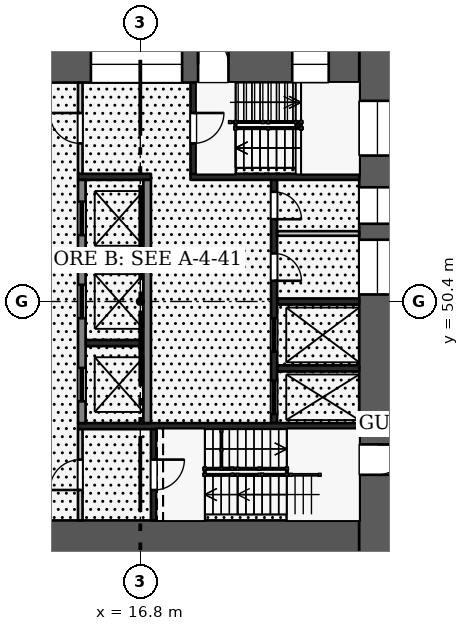
"""IFC4 building model, lengths in metres.
Left out: names, types, materials, properties, quantities, classifications, styles, units other than length and angle.
Written with IfcOpenShell. Run it as: python <this file> out.ifc"""

import sys

from ifc_helpers import new_model, si_unit, direction, frame, frame_2d, origin, place, context, subcontext, project, spatial, rectangle, extrude, element, fill, save


model = new_model("IFC4")
c1 = context("Model", 3, precision=1e-05, world=origin(), true_north=direction((0.0, 1.0)))
c2 = subcontext(c1, "Body", "Model", "MODEL_VIEW")
j1 = project(units=[si_unit("LENGTHUNIT", "METRE"), si_unit("PLANEANGLEUNIT", "RADIAN")], contexts=[c1])
p1 = place(None, origin())
s1 = spatial("IfcSite", under=j1, at=p1, CompositionType="ELEMENT")
p2 = place(p1, origin())
s2 = spatial("IfcBuilding", under=s1, at=p2, CompositionType="ELEMENT")
p3 = place(p2, origin())
s3 = spatial("IfcBuildingStorey", under=s2, at=p3, CompositionType="ELEMENT", Elevation=0.0)
p4 = place(p3, frame((24.6, 58.8, 0.0), z_axis=(0.0, 0.0, 1.0), x_axis=(0.0, -1.0, 0.0)))
e1 = element("IfcWall", 1, at=p4, inside=s3, PredefinedType="SHEAR", context=c2, shape_type="SweptSolid", body=[
    extrude(rectangle(XDim=16.8, YDim=1.2, at=frame_2d((8.4, 0.0))), origin(), (0.0, 0.0, 1.0), 8.7),
])
p5 = place(p4, frame((13.1, 0.0, 0.0)))
e2 = element("IfcOpeningElement", 2, at=p5, cuts=e1, PredefinedType="OPENING", context=c2, shape_type="SweptSolid", body=[
    extrude(rectangle(XDim=1.0, YDim=2.1, at=frame_2d((0.5, 1.05))), frame((0.0, 0.61, 0.0), z_axis=(0.0, -1.0, 0.0), x_axis=(1.0, 0.0, 0.0)), (0.0, 0.0, 1.0), 1.22),
])
p6 = place(p4, frame((1.8, 0.0, 0.5)))
e3 = element("IfcOpeningElement", 3, at=p6, cuts=e1, PredefinedType="OPENING", context=c2, shape_type="SweptSolid", body=[
    extrude(rectangle(XDim=1.8, YDim=2.4, at=frame_2d((0.9, 1.2))), frame((0.0, 0.61, 0.0), z_axis=(0.0, -1.0, 0.0), x_axis=(1.0, 0.0, 0.0)), (0.0, 0.0, 1.0), 1.22),
])
p7 = place(p4, frame((4.644, 0.0, 1.6)))
e4 = element("IfcOpeningElement", 4, at=p7, cuts=e1, PredefinedType="OPENING", context=c2, shape_type="SweptSolid", body=[
    extrude(rectangle(XDim=1.2, YDim=1.2, at=frame_2d((0.6, 0.6))), frame((0.0, 0.61, 0.0), z_axis=(0.0, -1.0, 0.0), x_axis=(1.0, 0.0, 0.0)), (0.0, 0.0, 1.0), 1.22),
])
p8 = place(p4, frame((6.369, 0.0, 1.6)))
e5 = element("IfcOpeningElement", 5, at=p8, cuts=e1, PredefinedType="OPENING", context=c2, shape_type="SweptSolid", body=[
    extrude(rectangle(XDim=1.8, YDim=1.2, at=frame_2d((0.9, 0.6))), frame((0.0, 0.61, 0.0), z_axis=(0.0, -1.0, 0.0), x_axis=(1.0, 0.0, 0.0)), (0.0, 0.0, 1.0), 1.22),
])
p9 = place(p3, frame((9.6, 58.2, 0.0), z_axis=(0.0, 0.0, 1.0), x_axis=(1.0, 0.0, 0.0)))
e6 = element("IfcWall", 6, at=p9, inside=s3, PredefinedType="SHEAR", context=c2, shape_type="SweptSolid", body=[
    extrude(rectangle(XDim=14.4, YDim=1.2, at=frame_2d((7.2, 0.0))), origin(), (0.0, 0.0, 1.0), 8.7),
])
p10 = place(p9, frame((2.1, 0.0, 0.0)))
e7 = element("IfcOpeningElement", 7, at=p10, cuts=e6, PredefinedType="OPENING", context=c2, shape_type="SweptSolid", body=[
    extrude(rectangle(XDim=1.8, YDim=2.1, at=frame_2d((0.9, 1.05))), frame((0.0, 0.61, 0.0), z_axis=(0.0, -1.0, 0.0), x_axis=(1.0, 0.0, 0.0)), (0.0, 0.0, 1.0), 1.22),
])
p11 = place(p9, frame((9.1, 0.0, 0.0)))
e8 = element("IfcOpeningElement", 8, at=p11, cuts=e6, PredefinedType="OPENING", context=c2, shape_type="SweptSolid", body=[
    extrude(rectangle(XDim=1.0, YDim=2.1, at=frame_2d((0.5, 1.05))), frame((0.0, 0.61, 0.0), z_axis=(0.0, -1.0, 0.0), x_axis=(1.0, 0.0, 0.0)), (0.0, 0.0, 1.0), 1.22),
])
p12 = place(p9, frame((5.575, 0.0, 0.6)))
e9 = element("IfcOpeningElement", 9, at=p12, cuts=e6, PredefinedType="OPENING", context=c2, shape_type="SweptSolid", body=[
    extrude(rectangle(XDim=3.0, YDim=2.1, at=frame_2d((1.5, 1.05))), frame((0.0, 0.61, 0.0), z_axis=(0.0, -1.0, 0.0), x_axis=(1.0, 0.0, 0.0)), (0.0, 0.0, 1.0), 1.22),
])
p13 = place(p9, frame((12.197, 0.0, 0.5)))
e10 = element("IfcOpeningElement", 10, at=p13, cuts=e6, PredefinedType="OPENING", context=c2, shape_type="SweptSolid", body=[
    extrude(rectangle(XDim=1.2, YDim=2.4, at=frame_2d((0.6, 1.2))), frame((0.0, 0.61, 0.0), z_axis=(0.0, -1.0, 0.0), x_axis=(1.0, 0.0, 0.0)), (0.0, 0.0, 1.0), 1.22),
])
p14 = place(p3, frame((9.6, 42.6, 0.0), z_axis=(0.0, 0.0, 1.0), x_axis=(1.0, 0.0, 0.0)))
e11 = element("IfcWall", 11, at=p14, inside=s3, PredefinedType="SHEAR", context=c2, shape_type="SweptSolid", body=[
    extrude(rectangle(XDim=14.4, YDim=1.2, at=frame_2d((7.2, 0.0))), origin(), (0.0, 0.0, 1.0), 8.7),
])
p15 = place(p14, frame((2.1, 0.0, 0.0)))
e12 = element("IfcOpeningElement", 12, at=p15, cuts=e11, PredefinedType="OPENING", context=c2, shape_type="SweptSolid", body=[
    extrude(rectangle(XDim=1.8, YDim=2.1, at=frame_2d((0.9, 1.05))), frame((0.0, 0.61, 0.0), z_axis=(0.0, -1.0, 0.0), x_axis=(1.0, 0.0, 0.0)), (0.0, 0.0, 1.0), 1.22),
])
for number, where, z_axis, x_axis in (
    (13, (15.0, 51.767, 0.0), (0.0, 0.0, 1.0), (1.0, 0.0, 0.0)),
    (14, (15.0, 49.033, 0.0), (0.0, 0.0, 1.0), (1.0, 0.0, 0.0)),
):
    element("IfcWall", number, at=place(p3, frame(where, z_axis=z_axis, x_axis=x_axis)), inside=s3, PredefinedType="SHEAR", context=c2, shape_type="SweptSolid", body=[
        extrude(rectangle(XDim=1.9, YDim=0.2, at=frame_2d((0.95, 0.0))), origin(), (0.0, 0.0, 1.0), 8.7),
    ])
p16 = place(p3, frame((14.875, 54.4, 0.0), z_axis=(0.0, 0.0, 1.0), x_axis=(0.0, -1.0, 0.0)))
e15 = element("IfcWall", 15, at=p16, inside=s3, PredefinedType="SHEAR", context=c2, shape_type="SweptSolid", body=[
    extrude(rectangle(XDim=8.0, YDim=0.25, at=frame_2d((4.0, 0.0))), origin(), (0.0, 0.0, 1.0), 8.7),
])
p17 = place(p16, frame((0.717, 0.0, 0.0)))
e16 = element("IfcOpeningElement", 16, at=p17, cuts=e15, PredefinedType="OPENING", context=c2, shape_type="SweptSolid", body=[
    extrude(rectangle(XDim=1.1, YDim=2.1, at=frame_2d((0.55, 1.05))), frame((0.0, 0.135, 0.0), z_axis=(0.0, -1.0, 0.0), x_axis=(1.0, 0.0, 0.0)), (0.0, 0.0, 1.0), 0.27),
])
p18 = place(p16, frame((3.45, 0.0, 0.0)))
e17 = element("IfcOpeningElement", 17, at=p18, cuts=e15, PredefinedType="OPENING", context=c2, shape_type="SweptSolid", body=[
    extrude(rectangle(XDim=1.1, YDim=2.1, at=frame_2d((0.55, 1.05))), frame((0.0, 0.135, 0.0), z_axis=(0.0, -1.0, 0.0), x_axis=(1.0, 0.0, 0.0)), (0.0, 0.0, 1.0), 0.27),
])
p19 = place(p16, frame((6.183, 0.0, 0.0)))
e18 = element("IfcOpeningElement", 18, at=p19, cuts=e15, PredefinedType="OPENING", context=c2, shape_type="SweptSolid", body=[
    extrude(rectangle(XDim=1.1, YDim=2.1, at=frame_2d((0.55, 1.05))), frame((0.0, 0.135, 0.0), z_axis=(0.0, -1.0, 0.0), x_axis=(1.0, 0.0, 0.0)), (0.0, 0.0, 1.0), 0.27),
])
p20 = place(p3, frame((17.025, 54.4, 0.0), z_axis=(0.0, 0.0, 1.0), x_axis=(0.0, -1.0, 0.0)))
e19 = element("IfcWall", 19, at=p20, inside=s3, PredefinedType="SHEAR", context=c2, shape_type="SweptSolid", body=[
    extrude(rectangle(XDim=8.0, YDim=0.25, at=frame_2d((4.0, 0.0))), origin(), (0.0, 0.0, 1.0), 8.7),
])
for number, where, z_axis, x_axis in (
    (20, (21.3, 50.4, 0.0), (0.0, 0.0, 1.0), (1.0, 0.0, 0.0)),
    (21, (21.3, 48.2, 0.0), (0.0, 0.0, 1.0), (1.0, 0.0, 0.0)),
):
    element("IfcWall", number, at=place(p3, frame(where, z_axis=z_axis, x_axis=x_axis)), inside=s3, PredefinedType="SHEAR", context=c2, shape_type="SweptSolid", body=[
        extrude(rectangle(XDim=2.7, YDim=0.2, at=frame_2d((1.35, 0.0))), origin(), (0.0, 0.0, 1.0), 8.7),
    ])
p21 = place(p3, frame((21.3, 52.637, 0.0), z_axis=(0.0, 0.0, 1.0), x_axis=(1.0, 0.0, 0.0)))
e22 = element("IfcWall", 22, at=p21, inside=s3, PredefinedType="PARTITIONING", context=c2, shape_type="SweptSolid", body=[
    extrude(rectangle(XDim=2.7, YDim=0.15, at=frame_2d((1.35, 0.0))), origin(), (0.0, 0.0, 1.0), 8.7),
])
p22 = place(p3, frame((21.2, 54.4, 0.0), z_axis=(0.0, 0.0, 1.0), x_axis=(0.0, -1.0, 0.0)))
e23 = element("IfcWall", 23, at=p22, inside=s3, PredefinedType="SHEAR", context=c2, shape_type="SweptSolid", body=[
    extrude(rectangle(XDim=8.0, YDim=0.2, at=frame_2d((4.0, 0.0))), origin(), (0.0, 0.0, 1.0), 8.7),
])
p23 = place(p22, frame((0.394, 0.0, 0.0)))
e24 = element("IfcOpeningElement", 24, at=p23, cuts=e23, PredefinedType="OPENING", context=c2, shape_type="SweptSolid", body=[
    extrude(rectangle(XDim=0.9, YDim=2.1, at=frame_2d((0.45, 1.05))), frame((0.0, 0.11, 0.0), z_axis=(0.0, -1.0, 0.0), x_axis=(1.0, 0.0, 0.0)), (0.0, 0.0, 1.0), 0.22),
])
p24 = place(p22, frame((2.419, 0.0, 0.0)))
e25 = element("IfcOpeningElement", 25, at=p24, cuts=e23, PredefinedType="OPENING", context=c2, shape_type="SweptSolid", body=[
    extrude(rectangle(XDim=0.9, YDim=2.1, at=frame_2d((0.45, 1.05))), frame((0.0, 0.11, 0.0), z_axis=(0.0, -1.0, 0.0), x_axis=(1.0, 0.0, 0.0)), (0.0, 0.0, 1.0), 0.22),
])
p25 = place(p22, frame((4.55, 0.0, 0.0)))
e26 = element("IfcOpeningElement", 26, at=p25, cuts=e23, PredefinedType="OPENING", context=c2, shape_type="SweptSolid", body=[
    extrude(rectangle(XDim=1.1, YDim=2.1, at=frame_2d((0.55, 1.05))), frame((0.0, 0.11, 0.0), z_axis=(0.0, -1.0, 0.0), x_axis=(1.0, 0.0, 0.0)), (0.0, 0.0, 1.0), 0.22),
])
p26 = place(p22, frame((6.6, 0.0, 0.0)))
e27 = element("IfcOpeningElement", 27, at=p26, cuts=e23, PredefinedType="OPENING", context=c2, shape_type="SweptSolid", body=[
    extrude(rectangle(XDim=1.1, YDim=2.1, at=frame_2d((0.55, 1.05))), frame((0.0, 0.11, 0.0), z_axis=(0.0, -1.0, 0.0), x_axis=(1.0, 0.0, 0.0)), (0.0, 0.0, 1.0), 0.22),
])
p27 = place(p3, frame((14.75, 54.5, 0.0), z_axis=(0.0, 0.0, 1.0), x_axis=(1.0, 0.0, 0.0)))
e28 = element("IfcWall", 28, at=p27, inside=s3, PredefinedType="SHEAR", context=c2, shape_type="SweptSolid", body=[
    extrude(rectangle(XDim=2.4, YDim=0.2, at=frame_2d((1.2, 0.0))), origin(), (0.0, 0.0, 1.0), 8.7),
])
p28 = place(p3, frame((18.45, 54.5, 0.0), z_axis=(0.0, 0.0, 1.0), x_axis=(1.0, 0.0, 0.0)))
e29 = element("IfcWall", 29, at=p28, inside=s3, PredefinedType="SHEAR", context=c2, shape_type="SweptSolid", body=[
    extrude(rectangle(XDim=5.55, YDim=0.2, at=frame_2d((2.775, 0.0))), origin(), (0.0, 0.0, 1.0), 8.7),
])
p29 = place(p3, frame((14.825, 57.6, 0.0), z_axis=(0.0, 0.0, 1.0), x_axis=(0.0, -1.0, 0.0)))
e30 = element("IfcWall", 30, at=p29, inside=s3, PredefinedType="PARTITIONING", context=c2, shape_type="SweptSolid", body=[
    extrude(rectangle(XDim=3.0, YDim=0.15, at=frame_2d((1.5, 0.0))), origin(), (0.0, 0.0, 1.0), 8.7),
])
p30 = place(p29, frame((1.0, 0.0, 0.0)))
e31 = element("IfcOpeningElement", 31, at=p30, cuts=e30, PredefinedType="OPENING", context=c2, shape_type="SweptSolid", body=[
    extrude(rectangle(XDim=1.0, YDim=2.1, at=frame_2d((0.5, 1.05))), frame((0.0, 0.085, 0.0), z_axis=(0.0, -1.0, 0.0), x_axis=(1.0, 0.0, 0.0)), (0.0, 0.0, 1.0), 0.17),
])
p31 = place(p3, frame((18.55, 57.6, 0.0), z_axis=(0.0, 0.0, 1.0), x_axis=(0.0, -1.0, 0.0)))
e32 = element("IfcWall", 32, at=p31, inside=s3, PredefinedType="SHEAR", context=c2, shape_type="SweptSolid", body=[
    extrude(rectangle(XDim=3.0, YDim=0.2, at=frame_2d((1.5, 0.0))), origin(), (0.0, 0.0, 1.0), 8.7),
])
p32 = place(p31, frame((1.0, 0.0, 0.0)))
e33 = element("IfcOpeningElement", 33, at=p32, cuts=e32, PredefinedType="OPENING", context=c2, shape_type="SweptSolid", body=[
    extrude(rectangle(XDim=1.0, YDim=2.1, at=frame_2d((0.5, 1.05))), frame((0.0, 0.11, 0.0), z_axis=(0.0, -1.0, 0.0), x_axis=(1.0, 0.0, 0.0)), (0.0, 0.0, 1.0), 0.22),
])
p33 = place(p3, frame((14.75, 46.3, 0.0), z_axis=(0.0, 0.0, 1.0), x_axis=(1.0, 0.0, 0.0)))
e34 = element("IfcWall", 34, at=p33, inside=s3, PredefinedType="SHEAR", context=c2, shape_type="SweptSolid", body=[
    extrude(rectangle(XDim=9.25, YDim=0.2, at=frame_2d((4.625, 0.0))), origin(), (0.0, 0.0, 1.0), 8.7),
])
p34 = place(p3, frame((14.825, 46.2, 0.0), z_axis=(0.0, 0.0, 1.0), x_axis=(0.0, -1.0, 0.0)))
e35 = element("IfcWall", 35, at=p34, inside=s3, PredefinedType="PARTITIONING", context=c2, shape_type="SweptSolid", body=[
    extrude(rectangle(XDim=3.0, YDim=0.15, at=frame_2d((1.5, 0.0))), origin(), (0.0, 0.0, 1.0), 8.7),
])
p35 = place(p34, frame((1.0, 0.0, 0.0)))
e36 = element("IfcOpeningElement", 36, at=p35, cuts=e35, PredefinedType="OPENING", context=c2, shape_type="SweptSolid", body=[
    extrude(rectangle(XDim=1.0, YDim=2.1, at=frame_2d((0.5, 1.05))), frame((0.0, 0.085, 0.0), z_axis=(0.0, -1.0, 0.0), x_axis=(1.0, 0.0, 0.0)), (0.0, 0.0, 1.0), 0.17),
])
p36 = place(p3, frame((17.25, 46.2, 0.0), z_axis=(0.0, 0.0, 1.0), x_axis=(0.0, -1.0, 0.0)))
e37 = element("IfcWall", 37, at=p36, inside=s3, PredefinedType="SHEAR", context=c2, shape_type="SweptSolid", body=[
    extrude(rectangle(XDim=3.0, YDim=0.2, at=frame_2d((1.5, 0.0))), origin(), (0.0, 0.0, 1.0), 8.7),
])
p37 = place(p36, frame((1.0, 0.0, 0.0)))
e38 = element("IfcOpeningElement", 38, at=p37, cuts=e37, PredefinedType="OPENING", context=c2, shape_type="SweptSolid", body=[
    extrude(rectangle(XDim=1.0, YDim=2.1, at=frame_2d((0.5, 1.05))), frame((0.0, 0.11, 0.0), z_axis=(0.0, -1.0, 0.0), x_axis=(1.0, 0.0, 0.0)), (0.0, 0.0, 1.0), 0.22),
])
p38 = place(p5, origin())
e39 = element("IfcDoor", 39, at=p38, inside=s3, OperationType="SINGLE_SWING_LEFT", PredefinedType="DOOR", context=c2, shape_type="SweptSolid", body=[
    extrude(rectangle(XDim=1.0, YDim=2.1, at=frame_2d((0.5, 1.05))), frame((0.0, 0.025, 0.0), z_axis=(0.0, -1.0, 0.0), x_axis=(1.0, 0.0, 0.0)), (0.0, 0.0, 1.0), 0.05),
])
fill(e2, e39)
p39 = place(p11, origin())
e40 = element("IfcDoor", 40, at=p39, inside=s3, OperationType="SINGLE_SWING_LEFT", PredefinedType="DOOR", context=c2, shape_type="SweptSolid", body=[
    extrude(rectangle(XDim=1.0, YDim=2.1, at=frame_2d((0.5, 1.05))), frame((0.0, 0.025, 0.0), z_axis=(0.0, -1.0, 0.0), x_axis=(1.0, 0.0, 0.0)), (0.0, 0.0, 1.0), 0.05),
])
fill(e8, e40)
p40 = place(p17, origin())
e41 = element("IfcDoor", 41, at=p40, inside=s3, OperationType="DOUBLE_DOOR_SLIDING", PredefinedType="DOOR", context=c2, shape_type="SweptSolid", body=[
    extrude(rectangle(XDim=1.1, YDim=2.1, at=frame_2d((0.55, 1.05))), frame((0.0, 0.025, 0.0), z_axis=(0.0, -1.0, 0.0), x_axis=(1.0, 0.0, 0.0)), (0.0, 0.0, 1.0), 0.05),
])
fill(e16, e41)
p41 = place(p18, origin())
e42 = element("IfcDoor", 42, at=p41, inside=s3, OperationType="DOUBLE_DOOR_SLIDING", PredefinedType="DOOR", context=c2, shape_type="SweptSolid", body=[
    extrude(rectangle(XDim=1.1, YDim=2.1, at=frame_2d((0.55, 1.05))), frame((0.0, 0.025, 0.0), z_axis=(0.0, -1.0, 0.0), x_axis=(1.0, 0.0, 0.0)), (0.0, 0.0, 1.0), 0.05),
])
fill(e17, e42)
p42 = place(p19, origin())
e43 = element("IfcDoor", 43, at=p42, inside=s3, OperationType="DOUBLE_DOOR_SLIDING", PredefinedType="DOOR", context=c2, shape_type="SweptSolid", body=[
    extrude(rectangle(XDim=1.1, YDim=2.1, at=frame_2d((0.55, 1.05))), frame((0.0, 0.025, 0.0), z_axis=(0.0, -1.0, 0.0), x_axis=(1.0, 0.0, 0.0)), (0.0, 0.0, 1.0), 0.05),
])
fill(e18, e43)
p43 = place(p23, origin())
e44 = element("IfcDoor", 44, at=p43, inside=s3, OperationType="SINGLE_SWING_RIGHT", PredefinedType="DOOR", context=c2, shape_type="SweptSolid", body=[
    extrude(rectangle(XDim=0.9, YDim=2.1, at=frame_2d((0.45, 1.05))), frame((0.0, 0.025, 0.0), z_axis=(0.0, -1.0, 0.0), x_axis=(1.0, 0.0, 0.0)), (0.0, 0.0, 1.0), 0.05),
])
fill(e24, e44)
p44 = place(p24, origin())
e45 = element("IfcDoor", 45, at=p44, inside=s3, OperationType="SINGLE_SWING_RIGHT", PredefinedType="DOOR", context=c2, shape_type="SweptSolid", body=[
    extrude(rectangle(XDim=0.9, YDim=2.1, at=frame_2d((0.45, 1.05))), frame((0.0, 0.025, 0.0), z_axis=(0.0, -1.0, 0.0), x_axis=(1.0, 0.0, 0.0)), (0.0, 0.0, 1.0), 0.05),
])
fill(e25, e45)
p45 = place(p25, origin())
e46 = element("IfcDoor", 46, at=p45, inside=s3, OperationType="DOUBLE_DOOR_SLIDING", PredefinedType="DOOR", context=c2, shape_type="SweptSolid", body=[
    extrude(rectangle(XDim=1.1, YDim=2.1, at=frame_2d((0.55, 1.05))), frame((0.0, 0.025, 0.0), z_axis=(0.0, -1.0, 0.0), x_axis=(1.0, 0.0, 0.0)), (0.0, 0.0, 1.0), 0.05),
])
fill(e26, e46)
p46 = place(p26, origin())
e47 = element("IfcDoor", 47, at=p46, inside=s3, OperationType="DOUBLE_DOOR_SLIDING", PredefinedType="DOOR", context=c2, shape_type="SweptSolid", body=[
    extrude(rectangle(XDim=1.1, YDim=2.1, at=frame_2d((0.55, 1.05))), frame((0.0, 0.025, 0.0), z_axis=(0.0, -1.0, 0.0), x_axis=(1.0, 0.0, 0.0)), (0.0, 0.0, 1.0), 0.05),
])
fill(e27, e47)
p47 = place(p30, frame((1.0, 0.0, 0.0), z_axis=(0.0, 0.0, 1.0), x_axis=(-1.0, 0.0, 0.0)))
e48 = element("IfcDoor", 48, at=p47, inside=s3, OperationType="SINGLE_SWING_RIGHT", PredefinedType="DOOR", context=c2, shape_type="SweptSolid", body=[
    extrude(rectangle(XDim=1.0, YDim=2.1, at=frame_2d((0.5, 1.05))), frame((0.0, 0.025, 0.0), z_axis=(0.0, -1.0, 0.0), x_axis=(1.0, 0.0, 0.0)), (0.0, 0.0, 1.0), 0.05),
])
fill(e31, e48)
p48 = place(p32, origin())
e49 = element("IfcDoor", 49, at=p48, inside=s3, OperationType="SINGLE_SWING_LEFT", PredefinedType="DOOR", context=c2, shape_type="SweptSolid", body=[
    extrude(rectangle(XDim=1.0, YDim=2.1, at=frame_2d((0.5, 1.05))), frame((0.0, 0.025, 0.0), z_axis=(0.0, -1.0, 0.0), x_axis=(1.0, 0.0, 0.0)), (0.0, 0.0, 1.0), 0.05),
])
fill(e33, e49)
p49 = place(p35, frame((1.0, 0.0, 0.0), z_axis=(0.0, 0.0, 1.0), x_axis=(-1.0, 0.0, 0.0)))
e50 = element("IfcDoor", 50, at=p49, inside=s3, OperationType="SINGLE_SWING_LEFT", PredefinedType="DOOR", context=c2, shape_type="SweptSolid", body=[
    extrude(rectangle(XDim=1.0, YDim=2.1, at=frame_2d((0.5, 1.05))), frame((0.0, 0.025, 0.0), z_axis=(0.0, -1.0, 0.0), x_axis=(1.0, 0.0, 0.0)), (0.0, 0.0, 1.0), 0.05),
])
fill(e36, e50)
p50 = place(p37, origin())
e51 = element("IfcDoor", 51, at=p50, inside=s3, OperationType="SINGLE_SWING_LEFT", PredefinedType="DOOR", context=c2, shape_type="SweptSolid", body=[
    extrude(rectangle(XDim=1.0, YDim=2.1, at=frame_2d((0.5, 1.05))), frame((0.0, 0.025, 0.0), z_axis=(0.0, -1.0, 0.0), x_axis=(1.0, 0.0, 0.0)), (0.0, 0.0, 1.0), 0.05),
])
fill(e38, e51)
p51 = place(p6, origin())
e52 = element("IfcWindow", 52, at=p51, inside=s3, PartitioningType="SINGLE_PANEL", PredefinedType="WINDOW", context=c2, shape_type="SweptSolid", body=[
    extrude(rectangle(XDim=1.8, YDim=2.4, at=frame_2d((0.9, 1.2))), frame((0.0, 0.03, 0.0), z_axis=(0.0, -1.0, 0.0), x_axis=(1.0, 0.0, 0.0)), (0.0, 0.0, 1.0), 0.06),
])
fill(e3, e52)
p52 = place(p7, origin())
e53 = element("IfcWindow", 53, at=p52, inside=s3, PartitioningType="SINGLE_PANEL", PredefinedType="WINDOW", context=c2, shape_type="SweptSolid", body=[
    extrude(rectangle(XDim=1.2, YDim=1.2, at=frame_2d((0.6, 0.6))), frame((0.0, 0.03, 0.0), z_axis=(0.0, -1.0, 0.0), x_axis=(1.0, 0.0, 0.0)), (0.0, 0.0, 1.0), 0.06),
])
fill(e4, e53)
p53 = place(p8, origin())
e54 = element("IfcWindow", 54, at=p53, inside=s3, PartitioningType="SINGLE_PANEL", PredefinedType="WINDOW", context=c2, shape_type="SweptSolid", body=[
    extrude(rectangle(XDim=1.8, YDim=1.2, at=frame_2d((0.9, 0.6))), frame((0.0, 0.03, 0.0), z_axis=(0.0, -1.0, 0.0), x_axis=(1.0, 0.0, 0.0)), (0.0, 0.0, 1.0), 0.06),
])
fill(e5, e54)
p54 = place(p12, origin())
e55 = element("IfcWindow", 55, at=p54, inside=s3, PartitioningType="SINGLE_PANEL", PredefinedType="WINDOW", context=c2, shape_type="SweptSolid", body=[
    extrude(rectangle(XDim=3.0, YDim=2.1, at=frame_2d((1.5, 1.05))), frame((0.0, 0.03, 0.0), z_axis=(0.0, -1.0, 0.0), x_axis=(1.0, 0.0, 0.0)), (0.0, 0.0, 1.0), 0.06),
])
fill(e9, e55)
p55 = place(p13, origin())
e56 = element("IfcWindow", 56, at=p55, inside=s3, PartitioningType="SINGLE_PANEL", PredefinedType="WINDOW", context=c2, shape_type="SweptSolid", body=[
    extrude(rectangle(XDim=1.2, YDim=2.4, at=frame_2d((0.6, 1.2))), frame((0.0, 0.03, 0.0), z_axis=(0.0, -1.0, 0.0), x_axis=(1.0, 0.0, 0.0)), (0.0, 0.0, 1.0), 0.06),
])
fill(e10, e56)
save(model, sys.argv[1])
